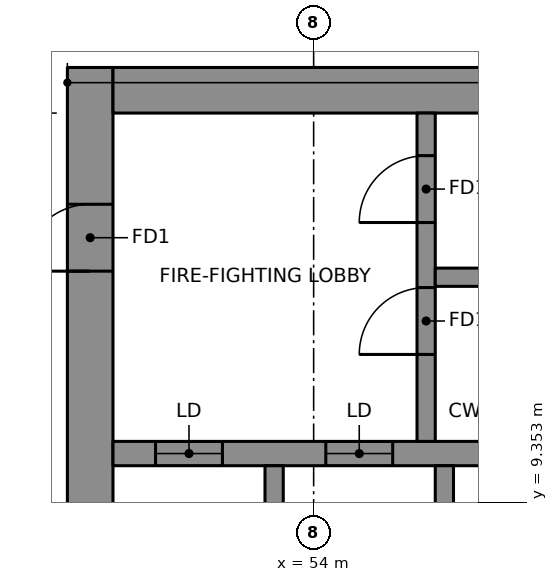
"""IFC4 building model, lengths in metres.
Left out: names, types, materials, properties, quantities, classifications, styles, units other than length and angle.
Written with IfcOpenShell. Run it as: python <this file> out.ifc"""

import sys

from ifc_helpers import new_model, si_unit, direction, frame, frame_2d, origin, place, context, subcontext, project, spatial, rectangle, extrude, element, fill, save


model = new_model("IFC4")
c1 = context("Model", 3, precision=1e-05, world=origin(), true_north=direction((0.0, 1.0)))
c2 = subcontext(c1, "Body", "Model", "MODEL_VIEW")
j1 = project(units=[si_unit("LENGTHUNIT", "METRE"), si_unit("PLANEANGLEUNIT", "RADIAN")], contexts=[c1])
p1 = place(None, origin())
s1 = spatial("IfcSite", under=j1, at=p1, CompositionType="ELEMENT")
p2 = place(p1, origin())
s2 = spatial("IfcBuilding", under=s1, at=p2, CompositionType="ELEMENT")
p3 = place(p2, frame((0.0, 0.0, 193.25)))
s3 = spatial("IfcBuildingStorey", under=s2, at=p3, CompositionType="ELEMENT", Elevation=193.25)
p4 = place(p3, frame((50.325, 6.65, 0.0), z_axis=(0.0, 0.0, 1.0), x_axis=(0.0, 1.0, 0.0)))
e1 = element("IfcWall", 1, at=p4, inside=s3, PredefinedType="SHEAR", context=c2, shape_type="SweptSolid", body=[
    extrude(rectangle(XDim=9.85, YDim=0.75, at=frame_2d((4.925, 0.0))), origin(), (0.0, 0.0, 1.0), 3.55),
])
p5 = place(p4, frame((6.5, 0.0, 0.0)))
e2 = element("IfcOpeningElement", 2, at=p5, cuts=e1, PredefinedType="OPENING", context=c2, shape_type="SweptSolid", body=[
    extrude(rectangle(XDim=1.1, YDim=2.1, at=frame_2d((0.55, 1.05))), frame((0.0, 0.385, 0.0), z_axis=(0.0, -1.0, 0.0), x_axis=(1.0, 0.0, 0.0)), (0.0, 0.0, 1.0), 0.77),
])
p6 = place(p3, frame((50.7, 16.125, 0.0), z_axis=(0.0, 0.0, 1.0), x_axis=(1.0, 0.0, 0.0)))
e3 = element("IfcWall", 3, at=p6, inside=s3, PredefinedType="SHEAR", context=c2, shape_type="SweptSolid", body=[
    extrude(rectangle(XDim=13.77, YDim=0.75, at=frame_2d((6.885, 0.0))), origin(), (0.0, 0.0, 1.0), 3.55),
])
p7 = place(p3, frame((50.7, 10.15, 0.0), z_axis=(0.0, 0.0, 1.0), x_axis=(1.0, 0.0, 0.0)))
e4 = element("IfcWall", 4, at=p7, inside=s3, PredefinedType="SHEAR", context=c2, shape_type="SweptSolid", body=[
    extrude(rectangle(XDim=13.02, YDim=0.4, at=frame_2d((6.51, 0.0))), origin(), (0.0, 0.0, 1.0), 3.55),
])
p8 = place(p7, frame((0.7, 0.0, 0.0)))
e5 = element("IfcOpeningElement", 5, at=p8, cuts=e4, PredefinedType="OPENING", context=c2, shape_type="SweptSolid", body=[
    extrude(rectangle(XDim=1.1, YDim=2.1, at=frame_2d((0.55, 1.05))), frame((0.0, 0.21, 0.0), z_axis=(0.0, -1.0, 0.0), x_axis=(1.0, 0.0, 0.0)), (0.0, 0.0, 1.0), 0.42),
])
p9 = place(p7, frame((3.5, 0.0, 0.0)))
e6 = element("IfcOpeningElement", 6, at=p9, cuts=e4, PredefinedType="OPENING", context=c2, shape_type="SweptSolid", body=[
    extrude(rectangle(XDim=1.1, YDim=2.1, at=frame_2d((0.55, 1.05))), frame((0.0, 0.21, 0.0), z_axis=(0.0, -1.0, 0.0), x_axis=(1.0, 0.0, 0.0)), (0.0, 0.0, 1.0), 0.42),
])
for number, where, z_axis, x_axis in (
    (7, (53.35, 6.95, 0.0), (0.0, 0.0, 1.0), (0.0, 1.0, 0.0)),
    (8, (56.15, 6.95, 0.0), (0.0, 0.0, 1.0), (0.0, 1.0, 0.0)),
):
    element("IfcWall", number, at=place(p3, frame(where, z_axis=z_axis, x_axis=x_axis)), inside=s3, PredefinedType="SHEAR", context=c2, shape_type="SweptSolid", body=[
        extrude(rectangle(XDim=3.0, YDim=0.3, at=frame_2d((1.5, 0.0))), origin(), (0.0, 0.0, 1.0), 3.55),
    ])
p10 = place(p3, frame((55.85, 10.35, 0.0), z_axis=(0.0, 0.0, 1.0), x_axis=(0.0, 1.0, 0.0)))
e9 = element("IfcWall", 9, at=p10, inside=s3, PredefinedType="SHEAR", context=c2, shape_type="SweptSolid", body=[
    extrude(rectangle(XDim=5.4, YDim=0.3, at=frame_2d((2.7, 0.0))), origin(), (0.0, 0.0, 1.0), 3.55),
])
p11 = place(p10, frame((1.43, 0.0, 0.0)))
e10 = element("IfcOpeningElement", 10, at=p11, cuts=e9, PredefinedType="OPENING", context=c2, shape_type="SweptSolid", body=[
    extrude(rectangle(XDim=1.1, YDim=2.1, at=frame_2d((0.55, 1.05))), frame((0.0, 0.16, 0.0), z_axis=(0.0, -1.0, 0.0), x_axis=(1.0, 0.0, 0.0)), (0.0, 0.0, 1.0), 0.32),
])
p12 = place(p10, frame((3.6, 0.0, 0.0)))
e11 = element("IfcOpeningElement", 11, at=p12, cuts=e9, PredefinedType="OPENING", context=c2, shape_type="SweptSolid", body=[
    extrude(rectangle(XDim=1.1, YDim=2.1, at=frame_2d((0.55, 1.05))), frame((0.0, 0.16, 0.0), z_axis=(0.0, -1.0, 0.0), x_axis=(1.0, 0.0, 0.0)), (0.0, 0.0, 1.0), 0.32),
])
p13 = place(p3, frame((56.0, 13.05, 0.0), z_axis=(0.0, 0.0, 1.0), x_axis=(1.0, 0.0, 0.0)))
e12 = element("IfcWall", 12, at=p13, inside=s3, PredefinedType="SHEAR", context=c2, shape_type="SweptSolid", body=[
    extrude(rectangle(XDim=7.72, YDim=0.3, at=frame_2d((3.86, 0.0))), origin(), (0.0, 0.0, 1.0), 3.55),
])
p14 = place(p8, origin())
e13 = element("IfcDoor", 13, at=p14, inside=s3, OperationType="DOUBLE_DOOR_SLIDING", PredefinedType="DOOR", context=c2, shape_type="SweptSolid", body=[
    extrude(rectangle(XDim=1.1, YDim=2.1, at=frame_2d((0.55, 1.05))), frame((0.0, 0.025, 0.0), z_axis=(0.0, -1.0, 0.0), x_axis=(1.0, 0.0, 0.0)), (0.0, 0.0, 1.0), 0.05),
])
fill(e5, e13)
p15 = place(p9, origin())
e14 = element("IfcDoor", 14, at=p15, inside=s3, OperationType="DOUBLE_DOOR_SLIDING", PredefinedType="DOOR", context=c2, shape_type="SweptSolid", body=[
    extrude(rectangle(XDim=1.1, YDim=2.1, at=frame_2d((0.55, 1.05))), frame((0.0, 0.025, 0.0), z_axis=(0.0, -1.0, 0.0), x_axis=(1.0, 0.0, 0.0)), (0.0, 0.0, 1.0), 0.05),
])
fill(e6, e14)
p16 = place(p11, origin())
e15 = element("IfcDoor", 15, at=p16, inside=s3, OperationType="SINGLE_SWING_RIGHT", PredefinedType="DOOR", context=c2, shape_type="SweptSolid", body=[
    extrude(rectangle(XDim=1.1, YDim=2.1, at=frame_2d((0.55, 1.05))), frame((0.0, 0.025, 0.0), z_axis=(0.0, -1.0, 0.0), x_axis=(1.0, 0.0, 0.0)), (0.0, 0.0, 1.0), 0.05),
])
fill(e10, e15)
p17 = place(p12, origin())
e16 = element("IfcDoor", 16, at=p17, inside=s3, OperationType="SINGLE_SWING_RIGHT", PredefinedType="DOOR", context=c2, shape_type="SweptSolid", body=[
    extrude(rectangle(XDim=1.1, YDim=2.1, at=frame_2d((0.55, 1.05))), frame((0.0, 0.025, 0.0), z_axis=(0.0, -1.0, 0.0), x_axis=(1.0, 0.0, 0.0)), (0.0, 0.0, 1.0), 0.05),
])
fill(e11, e16)
p18 = place(p5, origin())
e17 = element("IfcDoor", 17, at=p18, inside=s3, OperationType="SINGLE_SWING_RIGHT", PredefinedType="DOOR", context=c2, shape_type="SweptSolid", body=[
    extrude(rectangle(XDim=1.1, YDim=2.1, at=frame_2d((0.55, 1.05))), frame((0.0, 0.025, 0.0), z_axis=(0.0, -1.0, 0.0), x_axis=(1.0, 0.0, 0.0)), (0.0, 0.0, 1.0), 0.05),
])
fill(e2, e17)
save(model, sys.argv[1])
